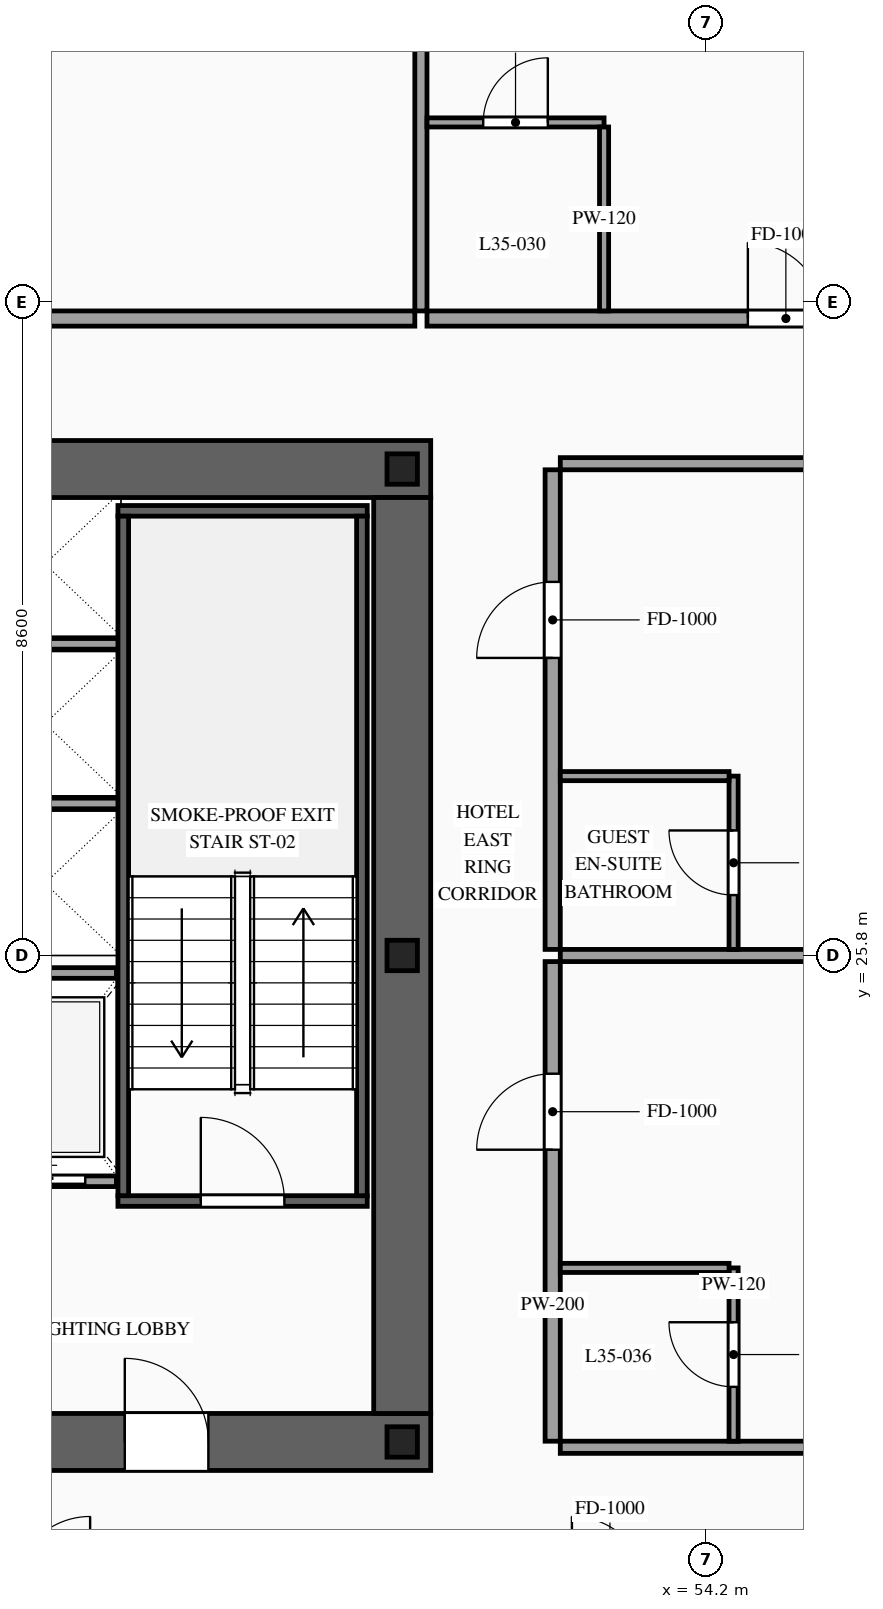
"""IFC4 building model, lengths in metres.
Left out: names, types, materials, properties, quantities, classifications, styles, units other than length and angle.
Written with IfcOpenShell. Run it as: python <this file> out.ifc"""

import sys

from ifc_helpers import new_model, si_unit, direction, frame, frame_2d, origin, origin_2d, place, context, subcontext, project, spatial, rectangle, i_section, extrude, source, transform, mapped, element, fill, save


model = new_model("IFC4")
c1 = context("Model", 3, precision=1e-05, world=origin(), true_north=direction((0.0, 1.0)))
c2 = subcontext(c1, "Body", "Model", "MODEL_VIEW")
j1 = project(units=[si_unit("LENGTHUNIT", "METRE"), si_unit("PLANEANGLEUNIT", "RADIAN")], contexts=[c1])
p1 = place(None, origin())
s1 = spatial("IfcSite", under=j1, at=p1, CompositionType="ELEMENT")
p2 = place(p1, origin())
s2 = spatial("IfcBuilding", under=s1, at=p2, CompositionType="ELEMENT")
p3 = place(p2, frame((0.0, 0.0, 134.4)))
s3 = spatial("IfcBuildingStorey", under=s2, at=p3, CompositionType="ELEMENT", Elevation=134.4)
p4 = place(p3, frame((23.425, 19.4, 0.0), z_axis=(0.0, 0.0, 1.0), x_axis=(1.0, 0.0, 0.0)))
e1 = element("IfcWall", 1, at=p4, inside=s3, PredefinedType="SHEAR", context=c2, shape_type="SweptSolid", body=[
    extrude(rectangle(XDim=27.15, YDim=0.75, at=frame_2d((13.575, 0.0))), origin(), (0.0, 0.0, 1.0), 3.6),
])
p5 = place(p4, frame((2.025, 0.0, 0.0)))
e2 = element("IfcOpeningElement", 2, at=p5, cuts=e1, PredefinedType="OPENING", context=c2, shape_type="SweptSolid", body=[
    extrude(rectangle(XDim=1.1, YDim=2.2, at=frame_2d((0.55, 1.1))), frame((0.0, 0.39, 0.0), z_axis=(0.0, -1.0, 0.0), x_axis=(1.0, 0.0, 0.0)), (0.0, 0.0, 1.0), 0.78),
])
p6 = place(p4, frame((9.925, 0.0, 0.0)))
e3 = element("IfcOpeningElement", 3, at=p6, cuts=e1, PredefinedType="OPENING", context=c2, shape_type="SweptSolid", body=[
    extrude(rectangle(XDim=1.1, YDim=2.2, at=frame_2d((0.55, 1.1))), frame((0.0, 0.39, 0.0), z_axis=(0.0, -1.0, 0.0), x_axis=(1.0, 0.0, 0.0)), (0.0, 0.0, 1.0), 0.78),
])
p7 = place(p4, frame((23.125, 0.0, 0.0)))
e4 = element("IfcOpeningElement", 4, at=p7, cuts=e1, PredefinedType="OPENING", context=c2, shape_type="SweptSolid", body=[
    extrude(rectangle(XDim=1.1, YDim=2.2, at=frame_2d((0.55, 1.1))), frame((0.0, 0.39, 0.0), z_axis=(0.0, -1.0, 0.0), x_axis=(1.0, 0.0, 0.0)), (0.0, 0.0, 1.0), 0.78),
])
p8 = place(p4, frame((19.745, 0.0, 0.0)))
e5 = element("IfcOpeningElement", 5, at=p8, cuts=e1, PredefinedType="OPENING", context=c2, shape_type="SweptSolid", body=[
    extrude(rectangle(XDim=0.9, YDim=2.15, at=frame_2d((0.45, 1.075))), frame((0.0, 0.39, 0.0), z_axis=(0.0, -1.0, 0.0), x_axis=(1.0, 0.0, 0.0)), (0.0, 0.0, 1.0), 0.78),
])
p9 = place(p4, frame((18.305, 0.0, 0.0)))
e6 = element("IfcOpeningElement", 6, at=p9, cuts=e1, PredefinedType="OPENING", context=c2, shape_type="SweptSolid", body=[
    extrude(rectangle(XDim=0.9, YDim=2.15, at=frame_2d((0.45, 1.075))), frame((0.0, 0.39, 0.0), z_axis=(0.0, -1.0, 0.0), x_axis=(1.0, 0.0, 0.0)), (0.0, 0.0, 1.0), 0.78),
])
p10 = place(p3, frame((23.425, 32.2, 0.0), z_axis=(0.0, 0.0, 1.0), x_axis=(1.0, 0.0, 0.0)))
e7 = element("IfcWall", 7, at=p10, inside=s3, PredefinedType="SHEAR", context=c2, shape_type="SweptSolid", body=[
    extrude(rectangle(XDim=27.15, YDim=0.75, at=frame_2d((13.575, 0.0))), origin(), (0.0, 0.0, 1.0), 3.6),
])
p11 = place(p10, frame((4.645, 0.0, 0.0)))
e8 = element("IfcOpeningElement", 8, at=p11, cuts=e7, PredefinedType="OPENING", context=c2, shape_type="SweptSolid", body=[
    extrude(rectangle(XDim=0.9, YDim=2.15, at=frame_2d((0.45, 1.075))), frame((0.0, 0.39, 0.0), z_axis=(0.0, -1.0, 0.0), x_axis=(1.0, 0.0, 0.0)), (0.0, 0.0, 1.0), 0.78),
])
p12 = place(p10, frame((9.925, 0.0, 0.0)))
e9 = element("IfcOpeningElement", 9, at=p12, cuts=e7, PredefinedType="OPENING", context=c2, shape_type="SweptSolid", body=[
    extrude(rectangle(XDim=1.1, YDim=2.2, at=frame_2d((0.55, 1.1))), frame((0.0, 0.39, 0.0), z_axis=(0.0, -1.0, 0.0), x_axis=(1.0, 0.0, 0.0)), (0.0, 0.0, 1.0), 0.78),
])
p13 = place(p10, frame((15.775, 0.0, 0.0)))
e10 = element("IfcOpeningElement", 10, at=p13, cuts=e7, PredefinedType="OPENING", context=c2, shape_type="SweptSolid", body=[
    extrude(rectangle(XDim=1.1, YDim=2.2, at=frame_2d((0.55, 1.1))), frame((0.0, 0.39, 0.0), z_axis=(0.0, -1.0, 0.0), x_axis=(1.0, 0.0, 0.0)), (0.0, 0.0, 1.0), 0.78),
])
p14 = place(p10, frame((18.975, 0.0, 0.0)))
e11 = element("IfcOpeningElement", 11, at=p14, cuts=e7, PredefinedType="OPENING", context=c2, shape_type="SweptSolid", body=[
    extrude(rectangle(XDim=0.9, YDim=2.15, at=frame_2d((0.45, 1.075))), frame((0.0, 0.39, 0.0), z_axis=(0.0, -1.0, 0.0), x_axis=(1.0, 0.0, 0.0)), (0.0, 0.0, 1.0), 0.78),
])
m1 = source(origin(), c2, "Body", "SweptSolid", [
    extrude(rectangle(XDim=12.05, YDim=0.75, at=frame_2d((6.025, 0.0))), origin(), (0.0, 0.0, 1.0), 3.6),
])
p15 = place(p3, frame((50.2, 19.775, 0.0), z_axis=(0.0, 0.0, 1.0), x_axis=(0.0, 1.0, 0.0)))
e12 = element("IfcWall", 12, at=p15, inside=s3, PredefinedType="SHEAR", context=c2, shape_type="MappedRepresentation", body=[
    mapped(m1, transform((0.0, 0.0, 0.0), scale=1.0)),
])
m2 = source(origin(), c2, "Body", "SweptSolid", [
    extrude(i_section(OverallWidth=0.4, OverallDepth=0.4, WebThickness=0.013, FlangeThickness=0.021, at=origin_2d()), origin(), (0.0, 0.0, 1.0), 3.6),
])
for number, where, z_axis, x_axis in (
    (13, (50.2, 19.4, 0.0), (0.0, 0.0, 1.0), (1.0, 0.0, 0.0)),
    (14, (50.2, 25.8, 0.0), (0.0, 0.0, 1.0), (1.0, 0.0, 0.0)),
    (15, (50.2, 32.2, 0.0), (0.0, 0.0, 1.0), (1.0, 0.0, 0.0)),
):
    element("IfcColumn", number, at=place(p3, frame(where, z_axis=z_axis, x_axis=x_axis)), inside=s3, PredefinedType="COLUMN", context=c2, shape_type="MappedRepresentation", body=[
        mapped(m2, transform((0.0, 0.0, 0.0), scale=1.0)),
    ])
p16 = place(p3, frame((44.52, 22.83, 0.0), z_axis=(0.0, 0.0, 1.0), x_axis=(1.0, 0.0, 0.0)))
e16 = element("IfcWall", 16, at=p16, inside=s3, PredefinedType="SOLIDWALL", context=c2, shape_type="SweptSolid", body=[
    extrude(rectangle(XDim=1.92, YDim=0.14, at=frame_2d((0.96, 0.0))), origin(), (0.0, 0.0, 1.0), 3.38),
])
p17 = place(p16, frame((0.41, 0.0, 0.0)))
e17 = element("IfcOpeningElement", 17, at=p17, cuts=e16, PredefinedType="OPENING", context=c2, shape_type="SweptSolid", body=[
    extrude(rectangle(XDim=1.1, YDim=2.2, at=frame_2d((0.55, 1.1))), frame((0.0, 0.085, 0.0), z_axis=(0.0, -1.0, 0.0), x_axis=(1.0, 0.0, 0.0)), (0.0, 0.0, 1.0), 0.17),
])
m3 = source(origin(), c2, "Body", "SweptSolid", [
    extrude(rectangle(XDim=1.92, YDim=0.14, at=frame_2d((0.96, 0.0))), origin(), (0.0, 0.0, 1.0), 3.38),
])
p18 = place(p3, frame((44.52, 25.57, 0.0), z_axis=(0.0, 0.0, 1.0), x_axis=(1.0, 0.0, 0.0)))
e18 = element("IfcWall", 18, at=p18, inside=s3, PredefinedType="SOLIDWALL", context=c2, shape_type="MappedRepresentation", body=[
    mapped(m3, transform((0.0, 0.0, 0.0), scale=1.0)),
])
m4 = source(origin(), c2, "Body", "SweptSolid", [
    extrude(rectangle(XDim=2.0, YDim=0.14, at=frame_2d((1.0, 0.0))), origin(), (0.0, 0.0, 1.0), 3.38),
])
for number, where, z_axis, x_axis in (
    (19, (44.5, 27.8, 0.0), (0.0, 0.0, 1.0), (1.0, 0.0, 0.0)),
    (20, (44.5, 29.9, 0.0), (0.0, 0.0, 1.0), (1.0, 0.0, 0.0)),
):
    element("IfcWall", number, at=place(p3, frame(where, z_axis=z_axis, x_axis=x_axis)), inside=s3, PredefinedType="SOLIDWALL", context=c2, shape_type="MappedRepresentation", body=[
        mapped(m4, transform((0.0, 0.0, 0.0), scale=1.0)),
    ])
p19 = place(p3, frame((46.46, 22.57, 0.0), z_axis=(0.0, 0.0, 1.0), x_axis=(1.0, 0.0, 0.0)))
e21 = element("IfcWall", 21, at=p19, inside=s3, PredefinedType="SOLIDWALL", context=c2, shape_type="SweptSolid", body=[
    extrude(rectangle(XDim=3.28, YDim=0.14, at=frame_2d((1.64, 0.0))), origin(), (0.0, 0.0, 1.0), 3.38),
])
p20 = place(p19, frame((1.09, 0.0, 0.0)))
e22 = element("IfcOpeningElement", 22, at=p20, cuts=e21, PredefinedType="OPENING", context=c2, shape_type="SweptSolid", body=[
    extrude(rectangle(XDim=1.1, YDim=2.2, at=frame_2d((0.55, 1.1))), frame((0.0, 0.085, 0.0), z_axis=(0.0, -1.0, 0.0), x_axis=(1.0, 0.0, 0.0)), (0.0, 0.0, 1.0), 0.17),
])
m5 = source(origin(), c2, "Body", "SweptSolid", [
    extrude(rectangle(XDim=3.28, YDim=0.14, at=frame_2d((1.64, 0.0))), origin(), (0.0, 0.0, 1.0), 3.38),
])
p21 = place(p3, frame((46.46, 31.65, 0.0), z_axis=(0.0, 0.0, 1.0), x_axis=(1.0, 0.0, 0.0)))
e23 = element("IfcWall", 23, at=p21, inside=s3, PredefinedType="SOLIDWALL", context=c2, shape_type="MappedRepresentation", body=[
    mapped(m5, transform((0.0, 0.0, 0.0), scale=1.0)),
])
m6 = source(origin(), c2, "Body", "SweptSolid", [
    extrude(rectangle(XDim=8.94, YDim=0.14, at=frame_2d((4.47, 0.0))), origin(), (0.0, 0.0, 1.0), 3.38),
])
for number, where, z_axis, x_axis in (
    (24, (46.53, 22.64, 0.0), (0.0, 0.0, 1.0), (0.0, 1.0, 0.0)),
    (25, (49.67, 22.64, 0.0), (0.0, 0.0, 1.0), (0.0, 1.0, 0.0)),
):
    element("IfcWall", number, at=place(p3, frame(where, z_axis=z_axis, x_axis=x_axis)), inside=s3, PredefinedType="SOLIDWALL", context=c2, shape_type="MappedRepresentation", body=[
        mapped(m6, transform((0.0, 0.0, 0.0), scale=1.0)),
    ])
p22 = place(p3, frame((39.342, 34.18, 0.0), z_axis=(0.0, 0.0, 1.0), x_axis=(1.0, 0.0, 0.0)))
e26 = element("IfcWall", 26, at=p22, inside=s3, PredefinedType="PARTITIONING", context=c2, shape_type="SweptSolid", body=[
    extrude(rectangle(XDim=11.024, YDim=0.2, at=frame_2d((5.512, 0.0))), origin(), (0.0, 0.0, 1.0), 3.38),
])
p23 = place(p22, frame((5.012, 0.0, 0.0)))
e27 = element("IfcOpeningElement", 27, at=p23, cuts=e26, PredefinedType="OPENING", context=c2, shape_type="SweptSolid", body=[
    extrude(rectangle(XDim=1.0, YDim=2.2, at=frame_2d((0.5, 1.1))), frame((0.0, 0.115, 0.0), z_axis=(0.0, -1.0, 0.0), x_axis=(1.0, 0.0, 0.0)), (0.0, 0.0, 1.0), 0.23),
])
m7 = source(origin(), c2, "Body", "SweptSolid", [
    extrude(rectangle(XDim=14.97, YDim=0.16, at=frame_2d((7.485, 0.0))), origin(), (0.0, 0.0, 1.0), 3.38),
])
p24 = place(p3, frame((50.446, 34.28, 0.0), z_axis=(0.0, 0.0, 1.0), x_axis=(0.0, 1.0, 0.0)))
e28 = element("IfcWall", 28, at=p24, inside=s3, PredefinedType="PARTITIONING", context=c2, shape_type="MappedRepresentation", body=[
    mapped(m7, transform((0.0, 0.0, 0.0), scale=1.0)),
])
p25 = place(p3, frame((50.526, 34.18, 0.0), z_axis=(0.0, 0.0, 1.0), x_axis=(1.0, 0.0, 0.0)))
e29 = element("IfcWall", 29, at=p25, inside=s3, PredefinedType="PARTITIONING", context=c2, shape_type="SweptSolid", body=[
    extrude(rectangle(XDim=7.034, YDim=0.2, at=frame_2d((3.517, 0.0))), origin(), (0.0, 0.0, 1.0), 3.38),
])
p26 = place(p25, frame((4.222, 0.0, 0.0)))
e30 = element("IfcOpeningElement", 30, at=p26, cuts=e29, PredefinedType="OPENING", context=c2, shape_type="SweptSolid", body=[
    extrude(rectangle(XDim=1.0, YDim=2.2, at=frame_2d((0.5, 1.1))), frame((0.0, 0.115, 0.0), z_axis=(0.0, -1.0, 0.0), x_axis=(1.0, 0.0, 0.0)), (0.0, 0.0, 1.0), 0.23),
])
p27 = place(p3, frame((50.526, 36.76, 0.0), z_axis=(0.0, 0.0, 1.0), x_axis=(1.0, 0.0, 0.0)))
e31 = element("IfcWall", 31, at=p27, inside=s3, PredefinedType="PARTITIONING", context=c2, shape_type="SweptSolid", body=[
    extrude(rectangle(XDim=2.33, YDim=0.12, at=frame_2d((1.165, 0.0))), origin(), (0.0, 0.0, 1.0), 3.38),
])
p28 = place(p27, frame((0.74, 0.0, 0.0)))
e32 = element("IfcOpeningElement", 32, at=p28, cuts=e31, PredefinedType="OPENING", context=c2, shape_type="SweptSolid", body=[
    extrude(rectangle(XDim=0.85, YDim=2.1, at=frame_2d((0.425, 1.05))), frame((0.0, 0.075, 0.0), z_axis=(0.0, -1.0, 0.0), x_axis=(1.0, 0.0, 0.0)), (0.0, 0.0, 1.0), 0.15),
])
m8 = source(origin(), c2, "Body", "SweptSolid", [
    extrude(rectangle(XDim=2.42, YDim=0.12, at=frame_2d((1.21, 0.0))), origin(), (0.0, 0.0, 1.0), 3.38),
])
p29 = place(p3, frame((52.856, 34.28, 0.0), z_axis=(0.0, 0.0, 1.0), x_axis=(0.0, 1.0, 0.0)))
e33 = element("IfcWall", 33, at=p29, inside=s3, PredefinedType="PARTITIONING", context=c2, shape_type="MappedRepresentation", body=[
    mapped(m8, transform((0.0, 0.0, 0.0), scale=1.0)),
])
p30 = place(p3, frame((52.18, 19.41, 0.0), z_axis=(0.0, 0.0, 1.0), x_axis=(0.0, 1.0, 0.0)))
e34 = element("IfcWall", 34, at=p30, inside=s3, PredefinedType="PARTITIONING", context=c2, shape_type="SweptSolid", body=[
    extrude(rectangle(XDim=6.31, YDim=0.2, at=frame_2d((3.155, 0.0))), origin(), (0.0, 0.0, 1.0), 3.38),
])
p31 = place(p30, frame((3.835, 0.0, 0.0)))
e35 = element("IfcOpeningElement", 35, at=p31, cuts=e34, PredefinedType="OPENING", context=c2, shape_type="SweptSolid", body=[
    extrude(rectangle(XDim=1.0, YDim=2.2, at=frame_2d((0.5, 1.1))), frame((0.0, 0.115, 0.0), z_axis=(0.0, -1.0, 0.0), x_axis=(1.0, 0.0, 0.0)), (0.0, 0.0, 1.0), 0.23),
])
m9 = source(origin(), c2, "Body", "SweptSolid", [
    extrude(rectangle(XDim=8.17, YDim=0.16, at=frame_2d((4.085, 0.0))), origin(), (0.0, 0.0, 1.0), 2.675),
])
p32 = place(p3, frame((52.28, 25.8, 0.0), z_axis=(0.0, 0.0, 1.0), x_axis=(1.0, 0.0, 0.0)))
e36 = element("IfcWall", 36, at=p32, inside=s3, PredefinedType="PARTITIONING", context=c2, shape_type="MappedRepresentation", body=[
    mapped(m9, transform((0.0, 0.0, 0.0), scale=1.0)),
])
m10 = source(origin(), c2, "Body", "SweptSolid", [
    extrude(rectangle(XDim=8.17, YDim=0.16, at=frame_2d((4.085, 0.0))), origin(), (0.0, 0.0, 1.0), 2.875),
])
p33 = place(p3, frame((52.28, 19.33, 0.0), z_axis=(0.0, 0.0, 1.0), x_axis=(1.0, 0.0, 0.0)))
e37 = element("IfcWall", 37, at=p33, inside=s3, PredefinedType="PARTITIONING", context=c2, shape_type="MappedRepresentation", body=[
    mapped(m10, transform((0.0, 0.0, 0.0), scale=1.0)),
])
p34 = place(p3, frame((54.56, 19.41, 0.0), z_axis=(0.0, 0.0, 1.0), x_axis=(0.0, 1.0, 0.0)))
e38 = element("IfcWall", 38, at=p34, inside=s3, PredefinedType="PARTITIONING", context=c2, shape_type="SweptSolid", body=[
    extrude(rectangle(XDim=2.28, YDim=0.12, at=frame_2d((1.14, 0.0))), origin(), (0.0, 0.0, 1.0), 3.38),
])
p35 = place(p34, frame((0.715, 0.0, 0.0)))
e39 = element("IfcOpeningElement", 39, at=p35, cuts=e38, PredefinedType="OPENING", context=c2, shape_type="SweptSolid", body=[
    extrude(rectangle(XDim=0.85, YDim=2.1, at=frame_2d((0.425, 1.05))), frame((0.0, 0.075, 0.0), z_axis=(0.0, -1.0, 0.0), x_axis=(1.0, 0.0, 0.0)), (0.0, 0.0, 1.0), 0.15),
])
m11 = source(origin(), c2, "Body", "SweptSolid", [
    extrude(rectangle(XDim=2.22, YDim=0.12, at=frame_2d((1.11, 0.0))), origin(), (0.0, 0.0, 1.0), 3.38),
])
p36 = place(p3, frame((52.28, 21.69, 0.0), z_axis=(0.0, 0.0, 1.0), x_axis=(1.0, 0.0, 0.0)))
e40 = element("IfcWall", 40, at=p36, inside=s3, PredefinedType="PARTITIONING", context=c2, shape_type="MappedRepresentation", body=[
    mapped(m11, transform((0.0, 0.0, 0.0), scale=1.0)),
])
p37 = place(p3, frame((52.18, 25.88, 0.0), z_axis=(0.0, 0.0, 1.0), x_axis=(0.0, 1.0, 0.0)))
e41 = element("IfcWall", 41, at=p37, inside=s3, PredefinedType="PARTITIONING", context=c2, shape_type="SweptSolid", body=[
    extrude(rectangle(XDim=6.31, YDim=0.2, at=frame_2d((3.155, 0.0))), origin(), (0.0, 0.0, 1.0), 3.38),
])
p38 = place(p37, frame((3.835, 0.0, 0.0)))
e42 = element("IfcOpeningElement", 42, at=p38, cuts=e41, PredefinedType="OPENING", context=c2, shape_type="SweptSolid", body=[
    extrude(rectangle(XDim=1.0, YDim=2.2, at=frame_2d((0.5, 1.1))), frame((0.0, 0.115, 0.0), z_axis=(0.0, -1.0, 0.0), x_axis=(1.0, 0.0, 0.0)), (0.0, 0.0, 1.0), 0.23),
])
p39 = place(p3, frame((52.28, 32.27, 0.0), z_axis=(0.0, 0.0, 1.0), x_axis=(1.0, 0.0, 0.0)))
e43 = element("IfcWall", 43, at=p39, inside=s3, PredefinedType="PARTITIONING", context=c2, shape_type="MappedRepresentation", body=[
    mapped(m10, transform((0.0, 0.0, 0.0), scale=1.0)),
])
p40 = place(p3, frame((54.56, 25.88, 0.0), z_axis=(0.0, 0.0, 1.0), x_axis=(0.0, 1.0, 0.0)))
e44 = element("IfcWall", 44, at=p40, inside=s3, PredefinedType="PARTITIONING", context=c2, shape_type="SweptSolid", body=[
    extrude(rectangle(XDim=2.28, YDim=0.12, at=frame_2d((1.14, 0.0))), origin(), (0.0, 0.0, 1.0), 3.38),
])
p41 = place(p40, frame((0.715, 0.0, 0.0)))
e45 = element("IfcOpeningElement", 45, at=p41, cuts=e44, PredefinedType="OPENING", context=c2, shape_type="SweptSolid", body=[
    extrude(rectangle(XDim=0.85, YDim=2.1, at=frame_2d((0.425, 1.05))), frame((0.0, 0.075, 0.0), z_axis=(0.0, -1.0, 0.0), x_axis=(1.0, 0.0, 0.0)), (0.0, 0.0, 1.0), 0.15),
])
p42 = place(p3, frame((52.28, 28.16, 0.0), z_axis=(0.0, 0.0, 1.0), x_axis=(1.0, 0.0, 0.0)))
e46 = element("IfcWall", 46, at=p42, inside=s3, PredefinedType="PARTITIONING", context=c2, shape_type="MappedRepresentation", body=[
    mapped(m11, transform((0.0, 0.0, 0.0), scale=1.0)),
])
m12 = source(origin(), c2, "Body", "SweptSolid", [
    extrude(rectangle(XDim=1.1, YDim=2.2, at=frame_2d((0.55, 1.1))), frame((0.0, 0.025, 0.0), z_axis=(0.0, -1.0, 0.0), x_axis=(1.0, 0.0, 0.0)), (0.0, 0.0, 1.0), 0.05),
])
p43 = place(p17, origin())
e47 = element("IfcDoor", 47, at=p43, inside=s3, OperationType="SLIDING_TO_RIGHT", PredefinedType="DOOR", context=c2, shape_type="MappedRepresentation", body=[
    mapped(m12, transform((0.0, 0.0, 0.0), scale=1.0)),
])
fill(e17, e47)
m13 = source(origin(), c2, "Body", "SweptSolid", [
    extrude(rectangle(XDim=1.1, YDim=2.2, at=frame_2d((0.55, 1.1))), frame((0.0, 0.025, 0.0), z_axis=(0.0, -1.0, 0.0), x_axis=(1.0, 0.0, 0.0)), (0.0, 0.0, 1.0), 0.05),
])
p44 = place(p20, origin())
e48 = element("IfcDoor", 48, at=p44, inside=s3, OperationType="SINGLE_SWING_LEFT", PredefinedType="DOOR", context=c2, shape_type="MappedRepresentation", body=[
    mapped(m13, transform((0.0, 0.0, 0.0), scale=1.0)),
])
fill(e22, e48)
p45 = place(p7, origin())
e49 = element("IfcDoor", 49, at=p45, inside=s3, OperationType="SINGLE_SWING_LEFT", PredefinedType="DOOR", context=c2, shape_type="MappedRepresentation", body=[
    mapped(m13, transform((0.0, 0.0, 0.0), scale=1.0)),
])
fill(e4, e49)
m14 = source(origin(), c2, "Body", "SweptSolid", [
    extrude(rectangle(XDim=1.0, YDim=2.2, at=frame_2d((0.5, 1.1))), frame((0.0, 0.025, 0.0), z_axis=(0.0, -1.0, 0.0), x_axis=(1.0, 0.0, 0.0)), (0.0, 0.0, 1.0), 0.05),
])
p46 = place(p26, origin())
e50 = element("IfcDoor", 50, at=p46, inside=s3, OperationType="SINGLE_SWING_LEFT", PredefinedType="DOOR", context=c2, shape_type="MappedRepresentation", body=[
    mapped(m14, transform((0.0, 0.0, 0.0), scale=1.0)),
])
fill(e30, e50)
m15 = source(origin(), c2, "Body", "SweptSolid", [
    extrude(rectangle(XDim=0.85, YDim=2.1, at=frame_2d((0.425, 1.05))), frame((0.0, 0.025, 0.0), z_axis=(0.0, -1.0, 0.0), x_axis=(1.0, 0.0, 0.0)), (0.0, 0.0, 1.0), 0.05),
])
p47 = place(p28, origin())
e51 = element("IfcDoor", 51, at=p47, inside=s3, OperationType="SINGLE_SWING_RIGHT", PredefinedType="DOOR", context=c2, shape_type="MappedRepresentation", body=[
    mapped(m15, transform((0.0, 0.0, 0.0), scale=1.0)),
])
fill(e32, e51)
p48 = place(p31, origin())
e52 = element("IfcDoor", 52, at=p48, inside=s3, OperationType="SINGLE_SWING_LEFT", PredefinedType="DOOR", context=c2, shape_type="MappedRepresentation", body=[
    mapped(m14, transform((0.0, 0.0, 0.0), scale=1.0)),
])
fill(e35, e52)
p49 = place(p35, origin())
e53 = element("IfcDoor", 53, at=p49, inside=s3, OperationType="SINGLE_SWING_RIGHT", PredefinedType="DOOR", context=c2, shape_type="MappedRepresentation", body=[
    mapped(m15, transform((0.0, 0.0, 0.0), scale=1.0)),
])
fill(e39, e53)
p50 = place(p38, origin())
e54 = element("IfcDoor", 54, at=p50, inside=s3, OperationType="SINGLE_SWING_LEFT", PredefinedType="DOOR", context=c2, shape_type="MappedRepresentation", body=[
    mapped(m14, transform((0.0, 0.0, 0.0), scale=1.0)),
])
fill(e42, e54)
p51 = place(p41, origin())
e55 = element("IfcDoor", 55, at=p51, inside=s3, OperationType="SINGLE_SWING_RIGHT", PredefinedType="DOOR", context=c2, shape_type="MappedRepresentation", body=[
    mapped(m15, transform((0.0, 0.0, 0.0), scale=1.0)),
])
fill(e45, e55)
save(model, sys.argv[1])
